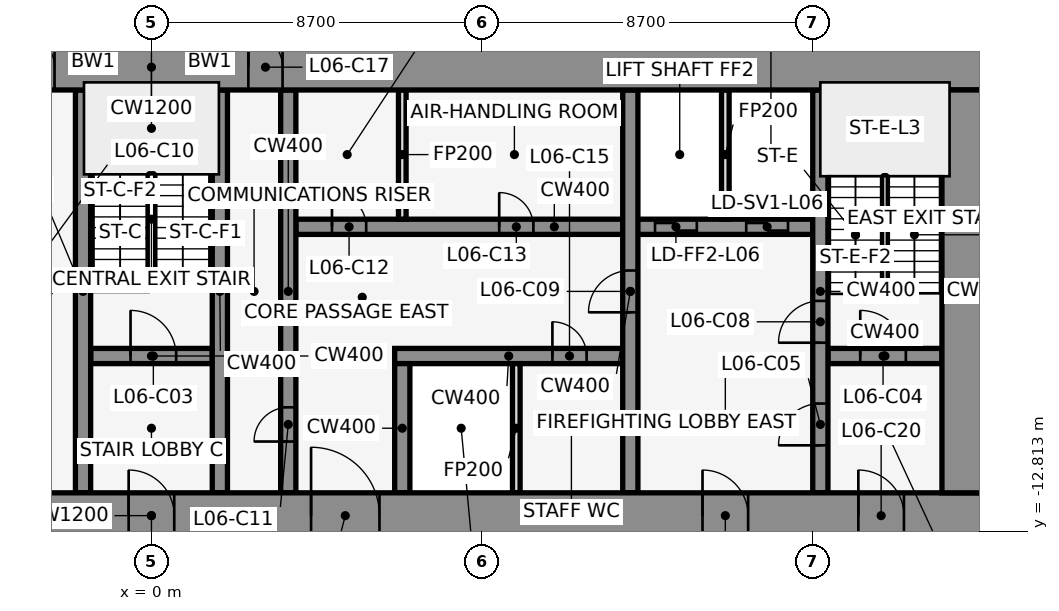
"""IFC4 building model, lengths in metres.
Left out: names, types, materials, properties, quantities, classifications, styles, units other than length and angle.
Written with IfcOpenShell. Run it as: python <this file> out.ifc"""

import sys

from ifc_helpers import new_model, si_unit, direction, frame, frame_2d, origin, place, context, subcontext, project, spatial, rectangle, extrude, element, fill, save


model = new_model("IFC4")
c1 = context("Model", 3, precision=1e-05, world=origin(), true_north=direction((0.0, 1.0)))
c2 = subcontext(c1, "Body", "Model", "MODEL_VIEW")
j1 = project(units=[si_unit("LENGTHUNIT", "METRE"), si_unit("PLANEANGLEUNIT", "RADIAN")], contexts=[c1])
p1 = place(None, origin())
s1 = spatial("IfcSite", under=j1, at=p1, CompositionType="ELEMENT")
p2 = place(p1, origin())
s2 = spatial("IfcBuilding", under=s1, at=p2, CompositionType="ELEMENT")
p3 = place(p2, frame((0.0, 0.0, 35.0)))
s3 = spatial("IfcBuildingStorey", under=s2, at=p3, CompositionType="ELEMENT", Elevation=35.0)
for number, where, z_axis, x_axis in (
    (1, (16.432, -0.105, 0.0), (0.0, 0.0, 1.0), (-0.84, 0.543, 0.0)),
    (2, (1.901, 1.08, 0.0), (0.0, 0.0, 1.0), (-0.84, -0.543, 0.0)),
    (3, (-0.068, -0.105, 0.0), (0.0, 0.0, 1.0), (-0.84, 0.543, 0.0)),
):
    element("IfcWall", number, at=place(p3, frame(where, z_axis=z_axis, x_axis=x_axis)), inside=s3, PredefinedType="STANDARD", context=c2, shape_type="SweptSolid", body=[
        extrude(rectangle(XDim=2.183, YDim=0.25, at=frame_2d((1.091, 0.0))), origin(), (0.0, 0.0, 1.0), 4.35),
    ])
p4 = place(p3, frame((-1.6, -8.2, 0.0), z_axis=(0.0, 0.0, 1.0), x_axis=(1.0, 0.0, 0.0)))
e4 = element("IfcWall", 4, at=p4, inside=s3, PredefinedType="SHEAR", context=c2, shape_type="SweptSolid", body=[
    extrude(rectangle(XDim=3.2, YDim=0.4, at=frame_2d((1.6, 0.0))), origin(), (0.0, 0.0, 1.0), 4.5),
])
p5 = place(p4, frame((1.05, 0.0, 0.0)))
e5 = element("IfcOpeningElement", 5, at=p5, cuts=e4, PredefinedType="OPENING", context=c2, shape_type="SweptSolid", body=[
    extrude(rectangle(XDim=1.2, YDim=2.1, at=frame_2d((0.6, 1.05))), frame((0.0, 0.212, 0.0), z_axis=(0.0, -1.0, 0.0), x_axis=(1.0, 0.0, 0.0)), (0.0, 0.0, 1.0), 0.424),
])
p6 = place(p3, frame((6.4, -8.2, 0.0), z_axis=(0.0, 0.0, 1.0), x_axis=(1.0, 0.0, 0.0)))
e6 = element("IfcWall", 6, at=p6, inside=s3, PredefinedType="SHEAR", context=c2, shape_type="SweptSolid", body=[
    extrude(rectangle(XDim=6.0, YDim=0.4, at=frame_2d((3.0, 0.0))), origin(), (0.0, 0.0, 1.0), 4.5),
])
p7 = place(p6, frame((4.15, 0.0, 0.0)))
e7 = element("IfcOpeningElement", 7, at=p7, cuts=e6, PredefinedType="OPENING", context=c2, shape_type="SweptSolid", body=[
    extrude(rectangle(XDim=0.9, YDim=2.1, at=frame_2d((0.45, 1.05))), frame((0.0, 0.212, 0.0), z_axis=(0.0, -1.0, 0.0), x_axis=(1.0, 0.0, 0.0)), (0.0, 0.0, 1.0), 0.424),
])
p8 = place(p3, frame((17.8, -8.2, 0.0), z_axis=(0.0, 0.0, 1.0), x_axis=(1.0, 0.0, 0.0)))
e8 = element("IfcWall", 8, at=p8, inside=s3, PredefinedType="SHEAR", context=c2, shape_type="SweptSolid", body=[
    extrude(rectangle(XDim=3.0, YDim=0.4, at=frame_2d((1.5, 0.0))), origin(), (0.0, 0.0, 1.0), 4.5),
])
p9 = place(p8, frame((0.85, 0.0, 0.0)))
e9 = element("IfcOpeningElement", 9, at=p9, cuts=e8, PredefinedType="OPENING", context=c2, shape_type="SweptSolid", body=[
    extrude(rectangle(XDim=1.2, YDim=2.1, at=frame_2d((0.6, 1.05))), frame((0.0, 0.212, 0.0), z_axis=(0.0, -1.0, 0.0), x_axis=(1.0, 0.0, 0.0)), (0.0, 0.0, 1.0), 0.424),
])
p10 = place(p3, frame((3.8, -4.8, 0.0), z_axis=(0.0, 0.0, 1.0), x_axis=(1.0, 0.0, 0.0)))
e10 = element("IfcWall", 10, at=p10, inside=s3, PredefinedType="SHEAR", context=c2, shape_type="SweptSolid", body=[
    extrude(rectangle(XDim=13.6, YDim=0.4, at=frame_2d((6.8, 0.0))), origin(), (0.0, 0.0, 1.0), 4.5),
])
p11 = place(p10, frame((9.45, 0.0, 0.0)))
e11 = element("IfcOpeningElement", 11, at=p11, cuts=e10, PredefinedType="OPENING", context=c2, shape_type="SweptSolid", body=[
    extrude(rectangle(XDim=1.1, YDim=2.1, at=frame_2d((0.55, 1.05))), frame((0.0, 0.212, 0.0), z_axis=(0.0, -1.0, 0.0), x_axis=(1.0, 0.0, 0.0)), (0.0, 0.0, 1.0), 0.424),
])
p12 = place(p10, frame((11.85, 0.0, 0.0)))
e12 = element("IfcOpeningElement", 12, at=p12, cuts=e10, PredefinedType="OPENING", context=c2, shape_type="SweptSolid", body=[
    extrude(rectangle(XDim=1.1, YDim=2.1, at=frame_2d((0.55, 1.05))), frame((0.0, 0.212, 0.0), z_axis=(0.0, -1.0, 0.0), x_axis=(1.0, 0.0, 0.0)), (0.0, 0.0, 1.0), 0.424),
])
p13 = place(p10, frame((0.95, 0.0, 0.0)))
e13 = element("IfcOpeningElement", 13, at=p13, cuts=e10, PredefinedType="OPENING", context=c2, shape_type="SweptSolid", body=[
    extrude(rectangle(XDim=0.9, YDim=2.1, at=frame_2d((0.45, 1.05))), frame((0.0, 0.212, 0.0), z_axis=(0.0, -1.0, 0.0), x_axis=(1.0, 0.0, 0.0)), (0.0, 0.0, 1.0), 0.424),
])
p14 = place(p10, frame((5.35, 0.0, 0.0)))
e14 = element("IfcOpeningElement", 14, at=p14, cuts=e10, PredefinedType="OPENING", context=c2, shape_type="SweptSolid", body=[
    extrude(rectangle(XDim=0.9, YDim=2.1, at=frame_2d((0.45, 1.05))), frame((0.0, 0.212, 0.0), z_axis=(0.0, -1.0, 0.0), x_axis=(1.0, 0.0, 0.0)), (0.0, 0.0, 1.0), 0.424),
])
for number, where, z_axis, x_axis in (
    (15, (-1.8, -11.8, 0.0), (0.0, 0.0, 1.0), (0.0, 1.0, 0.0)),
    (16, (1.8, -11.8, 0.0), (0.0, 0.0, 1.0), (0.0, 1.0, 0.0)),
):
    element("IfcWall", number, at=place(p3, frame(where, z_axis=z_axis, x_axis=x_axis)), inside=s3, PredefinedType="SHEAR", context=c2, shape_type="SweptSolid", body=[
        extrude(rectangle(XDim=10.6, YDim=0.4, at=frame_2d((5.3, 0.0))), origin(), (0.0, 0.0, 1.0), 4.5),
    ])
p15 = place(p3, frame((3.6, -11.8, 0.0), z_axis=(0.0, 0.0, 1.0), x_axis=(0.0, 1.0, 0.0)))
e17 = element("IfcWall", 17, at=p15, inside=s3, PredefinedType="SHEAR", context=c2, shape_type="SweptSolid", body=[
    extrude(rectangle(XDim=10.6, YDim=0.4, at=frame_2d((5.3, 0.0))), origin(), (0.0, 0.0, 1.0), 4.5),
])
p16 = place(p15, frame((1.35, 0.0, 0.0)))
e18 = element("IfcOpeningElement", 18, at=p16, cuts=e17, PredefinedType="OPENING", context=c2, shape_type="SweptSolid", body=[
    extrude(rectangle(XDim=0.9, YDim=2.1, at=frame_2d((0.45, 1.05))), frame((0.0, 0.212, 0.0), z_axis=(0.0, -1.0, 0.0), x_axis=(1.0, 0.0, 0.0)), (0.0, 0.0, 1.0), 0.424),
])
p17 = place(p3, frame((6.6, -11.8, 0.0), z_axis=(0.0, 0.0, 1.0), x_axis=(0.0, 1.0, 0.0)))
e19 = element("IfcWall", 19, at=p17, inside=s3, PredefinedType="SHEAR", context=c2, shape_type="SweptSolid", body=[
    extrude(rectangle(XDim=3.4, YDim=0.4, at=frame_2d((1.7, 0.0))), origin(), (0.0, 0.0, 1.0), 4.5),
])
for number, where, z_axis, x_axis in (
    (20, (6.6, -4.6, 0.0), (0.0, 0.0, 1.0), (0.0, 1.0, 0.0)),
    (21, (9.6, -11.8, 0.0), (0.0, 0.0, 1.0), (0.0, 1.0, 0.0)),
):
    element("IfcWall", number, at=place(p3, frame(where, z_axis=z_axis, x_axis=x_axis)), inside=s3, PredefinedType="PARTITIONING", context=c2, shape_type="SweptSolid", body=[
        extrude(rectangle(XDim=3.4, YDim=0.2, at=frame_2d((1.7, 0.0))), origin(), (0.0, 0.0, 1.0), 3.36),
    ])
p18 = place(p3, frame((12.6, -11.8, 0.0), z_axis=(0.0, 0.0, 1.0), x_axis=(0.0, 1.0, 0.0)))
e22 = element("IfcWall", 22, at=p18, inside=s3, PredefinedType="SHEAR", context=c2, shape_type="SweptSolid", body=[
    extrude(rectangle(XDim=10.6, YDim=0.4, at=frame_2d((5.3, 0.0))), origin(), (0.0, 0.0, 1.0), 4.5),
])
p19 = place(p18, frame((4.75, 0.0, 0.0)))
e23 = element("IfcOpeningElement", 23, at=p19, cuts=e22, PredefinedType="OPENING", context=c2, shape_type="SweptSolid", body=[
    extrude(rectangle(XDim=1.1, YDim=2.1, at=frame_2d((0.55, 1.05))), frame((0.0, 0.212, 0.0), z_axis=(0.0, -1.0, 0.0), x_axis=(1.0, 0.0, 0.0)), (0.0, 0.0, 1.0), 0.424),
])
p20 = place(p3, frame((15.1, -4.6, 0.0), z_axis=(0.0, 0.0, 1.0), x_axis=(0.0, 1.0, 0.0)))
e24 = element("IfcWall", 24, at=p20, inside=s3, PredefinedType="PARTITIONING", context=c2, shape_type="SweptSolid", body=[
    extrude(rectangle(XDim=3.4, YDim=0.2, at=frame_2d((1.7, 0.0))), origin(), (0.0, 0.0, 1.0), 3.36),
])
p21 = place(p3, frame((17.6, -11.8, 0.0), z_axis=(0.0, 0.0, 1.0), x_axis=(0.0, 1.0, 0.0)))
e25 = element("IfcWall", 25, at=p21, inside=s3, PredefinedType="SHEAR", context=c2, shape_type="SweptSolid", body=[
    extrude(rectangle(XDim=10.6, YDim=0.4, at=frame_2d((5.3, 0.0))), origin(), (0.0, 0.0, 1.0), 4.5),
])
p22 = place(p21, frame((1.25, 0.0, 0.0)))
e26 = element("IfcOpeningElement", 26, at=p22, cuts=e25, PredefinedType="OPENING", context=c2, shape_type="SweptSolid", body=[
    extrude(rectangle(XDim=1.1, YDim=2.1, at=frame_2d((0.55, 1.05))), frame((0.0, 0.212, 0.0), z_axis=(0.0, -1.0, 0.0), x_axis=(1.0, 0.0, 0.0)), (0.0, 0.0, 1.0), 0.424),
])
p23 = place(p21, frame((3.95, 0.0, 0.0)))
e27 = element("IfcOpeningElement", 27, at=p23, cuts=e25, PredefinedType="OPENING", context=c2, shape_type="SweptSolid", body=[
    extrude(rectangle(XDim=1.1, YDim=2.1, at=frame_2d((0.55, 1.05))), frame((0.0, 0.212, 0.0), z_axis=(0.0, -1.0, 0.0), x_axis=(1.0, 0.0, 0.0)), (0.0, 0.0, 1.0), 0.424),
])
p24 = place(p3, frame((-22.0, -0.6, 0.0), z_axis=(0.0, 0.0, 1.0), x_axis=(1.0, 0.0, 0.0)))
e28 = element("IfcWall", 28, at=p24, inside=s3, PredefinedType="SHEAR", context=c2, shape_type="SweptSolid", body=[
    extrude(rectangle(XDim=44.0, YDim=1.2, at=frame_2d((22.0, 0.0))), origin(), (0.0, 0.0, 1.0), 4.5),
])
p25 = place(p24, frame((18.55, 0.0, 0.0)))
e29 = element("IfcOpeningElement", 29, at=p25, cuts=e28, PredefinedType="OPENING", context=c2, shape_type="SweptSolid", body=[
    extrude(rectangle(XDim=0.9, YDim=2.1, at=frame_2d((0.45, 1.05))), frame((0.0, 0.612, 0.0), z_axis=(0.0, -1.0, 0.0), x_axis=(1.0, 0.0, 0.0)), (0.0, 0.0, 1.0), 1.224),
])
p26 = place(p24, frame((24.55, 0.0, 0.0)))
e30 = element("IfcOpeningElement", 30, at=p26, cuts=e28, PredefinedType="OPENING", context=c2, shape_type="SweptSolid", body=[
    extrude(rectangle(XDim=0.9, YDim=2.1, at=frame_2d((0.45, 1.05))), frame((0.0, 0.612, 0.0), z_axis=(0.0, -1.0, 0.0), x_axis=(1.0, 0.0, 0.0)), (0.0, 0.0, 1.0), 1.224),
])
p27 = place(p3, frame((-22.0, -12.4, 0.0), z_axis=(0.0, 0.0, 1.0), x_axis=(1.0, 0.0, 0.0)))
e31 = element("IfcWall", 31, at=p27, inside=s3, PredefinedType="SHEAR", context=c2, shape_type="SweptSolid", body=[
    extrude(rectangle(XDim=44.0, YDim=1.2, at=frame_2d((22.0, 0.0))), origin(), (0.0, 0.0, 1.0), 4.5),
])
p28 = place(p27, frame((2.2, 0.0, 0.0)))
e32 = element("IfcOpeningElement", 32, at=p28, cuts=e31, PredefinedType="OPENING", context=c2, shape_type="SweptSolid", body=[
    extrude(rectangle(XDim=1.2, YDim=2.1, at=frame_2d((0.6, 1.05))), frame((0.0, 0.612, 0.0), z_axis=(0.0, -1.0, 0.0), x_axis=(1.0, 0.0, 0.0)), (0.0, 0.0, 1.0), 1.224),
])
p29 = place(p27, frame((21.4, 0.0, 0.0)))
e33 = element("IfcOpeningElement", 33, at=p29, cuts=e31, PredefinedType="OPENING", context=c2, shape_type="SweptSolid", body=[
    extrude(rectangle(XDim=1.2, YDim=2.1, at=frame_2d((0.6, 1.05))), frame((0.0, 0.612, 0.0), z_axis=(0.0, -1.0, 0.0), x_axis=(1.0, 0.0, 0.0)), (0.0, 0.0, 1.0), 1.224),
])
p30 = place(p27, frame((40.6, 0.0, 0.0)))
e34 = element("IfcOpeningElement", 34, at=p30, cuts=e31, PredefinedType="OPENING", context=c2, shape_type="SweptSolid", body=[
    extrude(rectangle(XDim=1.2, YDim=2.1, at=frame_2d((0.6, 1.05))), frame((0.0, 0.612, 0.0), z_axis=(0.0, -1.0, 0.0), x_axis=(1.0, 0.0, 0.0)), (0.0, 0.0, 1.0), 1.224),
])
p31 = place(p27, frame((16.0, 0.0, 0.0)))
e35 = element("IfcOpeningElement", 35, at=p31, cuts=e31, PredefinedType="OPENING", context=c2, shape_type="SweptSolid", body=[
    extrude(rectangle(XDim=1.8, YDim=2.1, at=frame_2d((0.9, 1.05))), frame((0.0, 0.612, 0.0), z_axis=(0.0, -1.0, 0.0), x_axis=(1.0, 0.0, 0.0)), (0.0, 0.0, 1.0), 1.224),
])
p32 = place(p27, frame((6.3, 0.0, 0.0)))
e36 = element("IfcOpeningElement", 36, at=p32, cuts=e31, PredefinedType="OPENING", context=c2, shape_type="SweptSolid", body=[
    extrude(rectangle(XDim=1.2, YDim=2.1, at=frame_2d((0.6, 1.05))), frame((0.0, 0.612, 0.0), z_axis=(0.0, -1.0, 0.0), x_axis=(1.0, 0.0, 0.0)), (0.0, 0.0, 1.0), 1.224),
])
p33 = place(p27, frame((26.2, 0.0, 0.0)))
e37 = element("IfcOpeningElement", 37, at=p33, cuts=e31, PredefinedType="OPENING", context=c2, shape_type="SweptSolid", body=[
    extrude(rectangle(XDim=1.8, YDim=2.1, at=frame_2d((0.9, 1.05))), frame((0.0, 0.612, 0.0), z_axis=(0.0, -1.0, 0.0), x_axis=(1.0, 0.0, 0.0)), (0.0, 0.0, 1.0), 1.224),
])
p34 = place(p27, frame((36.5, 0.0, 0.0)))
e38 = element("IfcOpeningElement", 38, at=p34, cuts=e31, PredefinedType="OPENING", context=c2, shape_type="SweptSolid", body=[
    extrude(rectangle(XDim=1.2, YDim=2.1, at=frame_2d((0.6, 1.05))), frame((0.0, 0.612, 0.0), z_axis=(0.0, -1.0, 0.0), x_axis=(1.0, 0.0, 0.0)), (0.0, 0.0, 1.0), 1.224),
])
p35 = place(p3, frame((21.4, -11.8, 0.0), z_axis=(0.0, 0.0, 1.0), x_axis=(0.0, 1.0, 0.0)))
e39 = element("IfcWall", 39, at=p35, inside=s3, PredefinedType="SHEAR", context=c2, shape_type="SweptSolid", body=[
    extrude(rectangle(XDim=10.6, YDim=1.2, at=frame_2d((5.3, 0.0))), origin(), (0.0, 0.0, 1.0), 4.5),
])
p36 = place(p5, origin())
e40 = element("IfcDoor", 40, at=p36, inside=s3, OperationType="SINGLE_SWING_LEFT", PredefinedType="DOOR", context=c2, shape_type="SweptSolid", body=[
    extrude(rectangle(XDim=1.2, YDim=2.1, at=frame_2d((0.6, 1.05))), frame((0.0, 0.025, 0.0), z_axis=(0.0, -1.0, 0.0), x_axis=(1.0, 0.0, 0.0)), (0.0, 0.0, 1.0), 0.05),
])
fill(e5, e40)
p37 = place(p9, origin())
e41 = element("IfcDoor", 41, at=p37, inside=s3, OperationType="SINGLE_SWING_RIGHT", PredefinedType="DOOR", context=c2, shape_type="SweptSolid", body=[
    extrude(rectangle(XDim=1.2, YDim=2.1, at=frame_2d((0.6, 1.05))), frame((0.0, 0.025, 0.0), z_axis=(0.0, -1.0, 0.0), x_axis=(1.0, 0.0, 0.0)), (0.0, 0.0, 1.0), 0.05),
])
fill(e9, e41)
p38 = place(p22, origin())
e42 = element("IfcDoor", 42, at=p38, inside=s3, OperationType="SINGLE_SWING_LEFT", PredefinedType="DOOR", context=c2, shape_type="SweptSolid", body=[
    extrude(rectangle(XDim=1.1, YDim=2.1, at=frame_2d((0.55, 1.05))), frame((0.0, 0.025, 0.0), z_axis=(0.0, -1.0, 0.0), x_axis=(1.0, 0.0, 0.0)), (0.0, 0.0, 1.0), 0.05),
])
fill(e26, e42)
p39 = place(p11, origin())
e43 = element("IfcDoor", 43, at=p39, inside=s3, OperationType="DOUBLE_DOOR_SLIDING", PredefinedType="DOOR", context=c2, shape_type="SweptSolid", body=[
    extrude(rectangle(XDim=1.1, YDim=2.1, at=frame_2d((0.55, 1.05))), frame((0.0, 0.025, 0.0), z_axis=(0.0, -1.0, 0.0), x_axis=(1.0, 0.0, 0.0)), (0.0, 0.0, 1.0), 0.05),
])
fill(e11, e43)
p40 = place(p12, origin())
e44 = element("IfcDoor", 44, at=p40, inside=s3, OperationType="DOUBLE_DOOR_SLIDING", PredefinedType="DOOR", context=c2, shape_type="SweptSolid", body=[
    extrude(rectangle(XDim=1.1, YDim=2.1, at=frame_2d((0.55, 1.05))), frame((0.0, 0.025, 0.0), z_axis=(0.0, -1.0, 0.0), x_axis=(1.0, 0.0, 0.0)), (0.0, 0.0, 1.0), 0.05),
])
fill(e12, e44)
p41 = place(p23, origin())
e45 = element("IfcDoor", 45, at=p41, inside=s3, OperationType="SINGLE_SWING_RIGHT", PredefinedType="DOOR", context=c2, shape_type="SweptSolid", body=[
    extrude(rectangle(XDim=1.1, YDim=2.1, at=frame_2d((0.55, 1.05))), frame((0.0, 0.025, 0.0), z_axis=(0.0, -1.0, 0.0), x_axis=(1.0, 0.0, 0.0)), (0.0, 0.0, 1.0), 0.05),
])
fill(e27, e45)
p42 = place(p19, frame((1.1, 0.0, 0.0), z_axis=(0.0, 0.0, 1.0), x_axis=(-1.0, 0.0, 0.0)))
e46 = element("IfcDoor", 46, at=p42, inside=s3, OperationType="SINGLE_SWING_RIGHT", PredefinedType="DOOR", context=c2, shape_type="SweptSolid", body=[
    extrude(rectangle(XDim=1.1, YDim=2.1, at=frame_2d((0.55, 1.05))), frame((0.0, 0.025, 0.0), z_axis=(0.0, -1.0, 0.0), x_axis=(1.0, 0.0, 0.0)), (0.0, 0.0, 1.0), 0.05),
])
fill(e23, e46)
p43 = place(p16, origin())
e47 = element("IfcDoor", 47, at=p43, inside=s3, OperationType="SINGLE_SWING_LEFT", PredefinedType="DOOR", context=c2, shape_type="SweptSolid", body=[
    extrude(rectangle(XDim=0.9, YDim=2.1, at=frame_2d((0.45, 1.05))), frame((0.0, 0.025, 0.0), z_axis=(0.0, -1.0, 0.0), x_axis=(1.0, 0.0, 0.0)), (0.0, 0.0, 1.0), 0.05),
])
fill(e18, e47)
p44 = place(p13, origin())
e48 = element("IfcDoor", 48, at=p44, inside=s3, OperationType="SINGLE_SWING_RIGHT", PredefinedType="DOOR", context=c2, shape_type="SweptSolid", body=[
    extrude(rectangle(XDim=0.9, YDim=2.1, at=frame_2d((0.45, 1.05))), frame((0.0, 0.025, 0.0), z_axis=(0.0, -1.0, 0.0), x_axis=(1.0, 0.0, 0.0)), (0.0, 0.0, 1.0), 0.05),
])
fill(e13, e48)
p45 = place(p14, origin())
e49 = element("IfcDoor", 49, at=p45, inside=s3, OperationType="SINGLE_SWING_LEFT", PredefinedType="DOOR", context=c2, shape_type="SweptSolid", body=[
    extrude(rectangle(XDim=0.9, YDim=2.1, at=frame_2d((0.45, 1.05))), frame((0.0, 0.025, 0.0), z_axis=(0.0, -1.0, 0.0), x_axis=(1.0, 0.0, 0.0)), (0.0, 0.0, 1.0), 0.05),
])
fill(e14, e49)
p46 = place(p7, frame((0.9, 0.0, 0.0), z_axis=(0.0, 0.0, 1.0), x_axis=(-1.0, 0.0, 0.0)))
e50 = element("IfcDoor", 50, at=p46, inside=s3, OperationType="SINGLE_SWING_RIGHT", PredefinedType="DOOR", context=c2, shape_type="SweptSolid", body=[
    extrude(rectangle(XDim=0.9, YDim=2.1, at=frame_2d((0.45, 1.05))), frame((0.0, 0.025, 0.0), z_axis=(0.0, -1.0, 0.0), x_axis=(1.0, 0.0, 0.0)), (0.0, 0.0, 1.0), 0.05),
])
fill(e7, e50)
p47 = place(p25, origin())
e51 = element("IfcDoor", 51, at=p47, inside=s3, OperationType="SINGLE_SWING_LEFT", PredefinedType="DOOR", context=c2, shape_type="SweptSolid", body=[
    extrude(rectangle(XDim=0.9, YDim=2.1, at=frame_2d((0.45, 1.05))), frame((0.0, 0.025, 0.0), z_axis=(0.0, -1.0, 0.0), x_axis=(1.0, 0.0, 0.0)), (0.0, 0.0, 1.0), 0.05),
])
fill(e29, e51)
p48 = place(p26, origin())
e52 = element("IfcDoor", 52, at=p48, inside=s3, OperationType="SINGLE_SWING_LEFT", PredefinedType="DOOR", context=c2, shape_type="SweptSolid", body=[
    extrude(rectangle(XDim=0.9, YDim=2.1, at=frame_2d((0.45, 1.05))), frame((0.0, 0.025, 0.0), z_axis=(0.0, -1.0, 0.0), x_axis=(1.0, 0.0, 0.0)), (0.0, 0.0, 1.0), 0.05),
])
fill(e30, e52)
p49 = place(p29, frame((1.2, 0.0, 0.0), z_axis=(0.0, 0.0, 1.0), x_axis=(-1.0, 0.0, 0.0)))
e53 = element("IfcDoor", 53, at=p49, inside=s3, OperationType="SINGLE_SWING_RIGHT", PredefinedType="DOOR", context=c2, shape_type="SweptSolid", body=[
    extrude(rectangle(XDim=1.2, YDim=2.1, at=frame_2d((0.6, 1.05))), frame((0.0, 0.025, 0.0), z_axis=(0.0, -1.0, 0.0), x_axis=(1.0, 0.0, 0.0)), (0.0, 0.0, 1.0), 0.05),
])
fill(e33, e53)
p50 = place(p30, frame((1.2, 0.0, 0.0), z_axis=(0.0, 0.0, 1.0), x_axis=(-1.0, 0.0, 0.0)))
e54 = element("IfcDoor", 54, at=p50, inside=s3, OperationType="SINGLE_SWING_RIGHT", PredefinedType="DOOR", context=c2, shape_type="SweptSolid", body=[
    extrude(rectangle(XDim=1.2, YDim=2.1, at=frame_2d((0.6, 1.05))), frame((0.0, 0.025, 0.0), z_axis=(0.0, -1.0, 0.0), x_axis=(1.0, 0.0, 0.0)), (0.0, 0.0, 1.0), 0.05),
])
fill(e34, e54)
p51 = place(p33, origin())
e55 = element("IfcDoor", 55, at=p51, inside=s3, OperationType="SINGLE_SWING_LEFT", PredefinedType="DOOR", context=c2, shape_type="SweptSolid", body=[
    extrude(rectangle(XDim=1.8, YDim=2.1, at=frame_2d((0.9, 1.05))), frame((0.0, 0.025, 0.0), z_axis=(0.0, -1.0, 0.0), x_axis=(1.0, 0.0, 0.0)), (0.0, 0.0, 1.0), 0.05),
])
fill(e37, e55)
p52 = place(p34, frame((1.2, 0.0, 0.0), z_axis=(0.0, 0.0, 1.0), x_axis=(-1.0, 0.0, 0.0)))
e56 = element("IfcDoor", 56, at=p52, inside=s3, OperationType="SINGLE_SWING_RIGHT", PredefinedType="DOOR", context=c2, shape_type="SweptSolid", body=[
    extrude(rectangle(XDim=1.2, YDim=2.1, at=frame_2d((0.6, 1.05))), frame((0.0, 0.025, 0.0), z_axis=(0.0, -1.0, 0.0), x_axis=(1.0, 0.0, 0.0)), (0.0, 0.0, 1.0), 0.05),
])
fill(e38, e56)
save(model, sys.argv[1])
